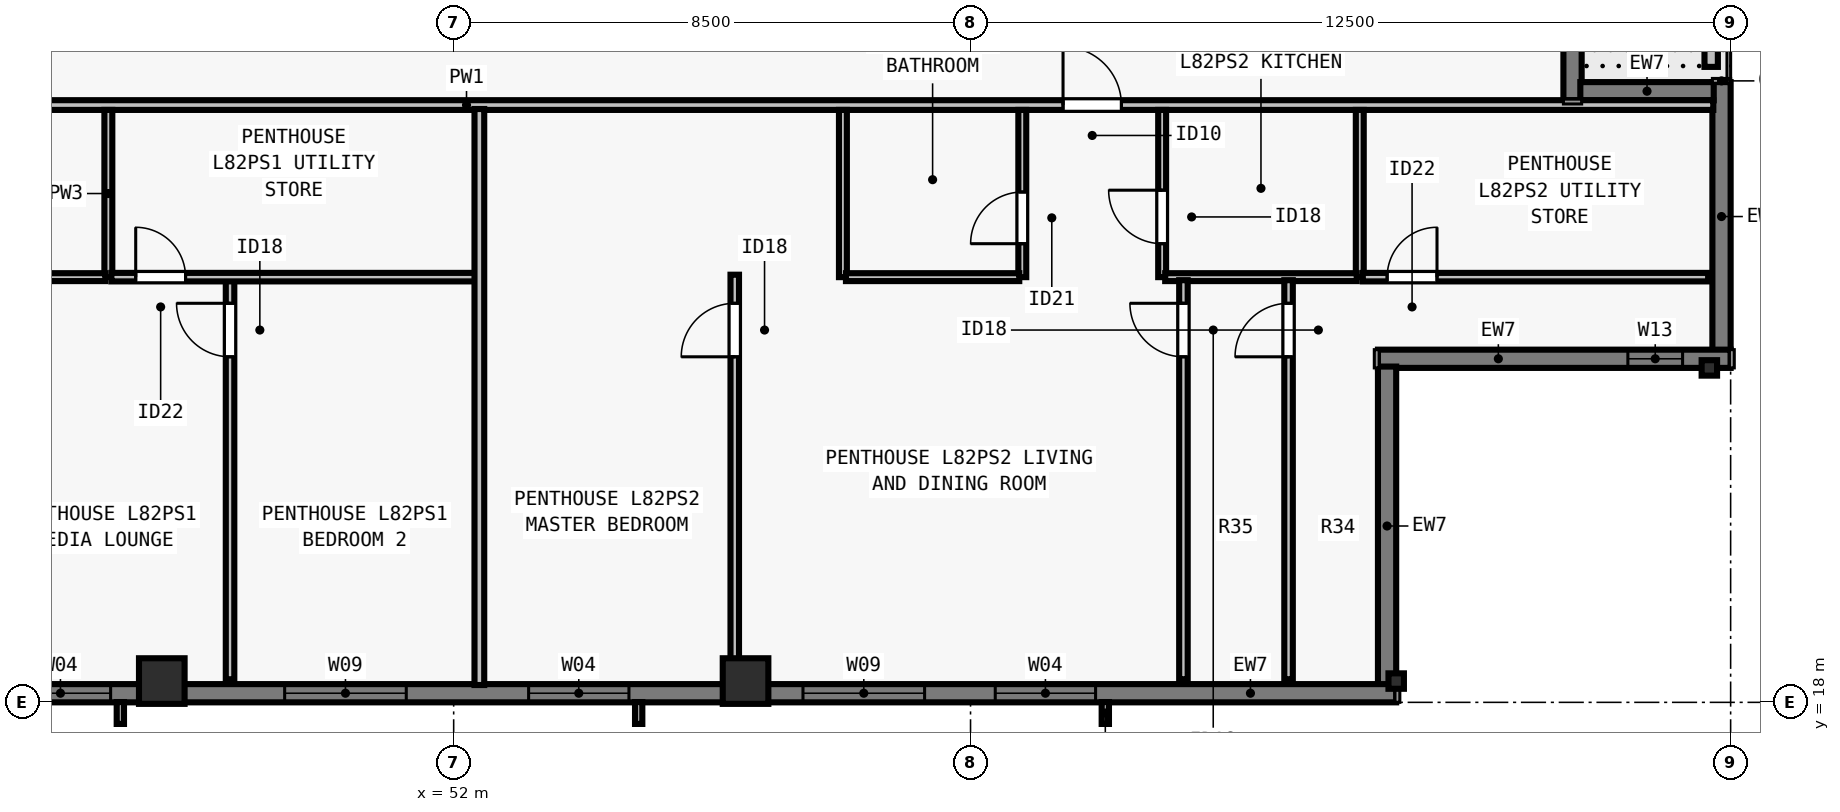
"""IFC4 building model, lengths in metres.
Left out: names, types, materials, properties, quantities, classifications, styles, units other than length and angle.
Written with IfcOpenShell. Run it as: python <this file> out.ifc"""

import sys

from ifc_helpers import new_model, si_unit, direction, frame, frame_2d, origin, origin_2d, place, context, subcontext, project, spatial, rectangle, i_section, extrude, element, fill, save


model = new_model("IFC4")
c1 = context("Model", 3, precision=1e-05, world=origin(), true_north=direction((0.0, 1.0)))
c2 = subcontext(c1, "Body", "Model", "MODEL_VIEW")
j1 = project(units=[si_unit("LENGTHUNIT", "METRE"), si_unit("PLANEANGLEUNIT", "RADIAN")], contexts=[c1])
p1 = place(None, origin())
s1 = spatial("IfcSite", under=j1, at=p1, CompositionType="ELEMENT")
p2 = place(p1, origin())
s2 = spatial("IfcBuilding", under=s1, at=p2, CompositionType="ELEMENT")
p3 = place(p2, frame((0.0, 0.0, 298.0)))
s3 = spatial("IfcBuildingStorey", under=s2, at=p3, CompositionType="ELEMENT", Elevation=298.0)
for number, where, z_axis, x_axis in (
    (1, (47.2, 18.35, 0.0), (0.0, 0.0, 1.0), (1.0, 0.0, 0.0)),
    (2, (56.8, 18.35, 0.0), (0.0, 0.0, 1.0), (1.0, 0.0, 0.0)),
):
    element("IfcColumn", number, at=place(p3, frame(where, z_axis=z_axis, x_axis=x_axis)), inside=s3, PredefinedType="COLUMN", context=c2, shape_type="SweptSolid", body=[
        extrude(rectangle(XDim=0.75, YDim=0.75, at=origin_2d()), origin(), (0.0, 0.0, 1.0), 3.5),
    ])
for number, where, z_axis, x_axis in (
    (3, (67.5, 18.35, 0.0), (0.0, 0.0, 1.0), (1.0, 0.0, 0.0)),
    (4, (72.65, 23.5, 0.0), (0.0, 0.0, 1.0), (0.0, 1.0, 0.0)),
):
    element("IfcColumn", number, at=place(p3, frame(where, z_axis=z_axis, x_axis=x_axis)), inside=s3, PredefinedType="COLUMN", context=c2, shape_type="SweptSolid", body=[
        extrude(i_section(OverallWidth=0.254, OverallDepth=0.254, WebThickness=0.009, FlangeThickness=0.014, FilletRadius=0.013, at=origin_2d()), origin(), (0.0, 0.0, 1.0), 3.5),
    ])
p4 = place(p3, frame((72.85, 28.2, 0.0), z_axis=(0.0, 0.0, 1.0), x_axis=(0.0, -1.0, 0.0)))
e5 = element("IfcWall", 5, at=p4, inside=s3, PredefinedType="SOLIDWALL", context=c2, shape_type="SweptSolid", body=[
    extrude(rectangle(XDim=4.422, YDim=0.3, at=frame_2d((2.211, 0.0))), origin(), (0.0, 0.0, 1.0), 3.29),
])
p5 = place(p3, frame((73.0, 23.65, 0.0), z_axis=(0.0, 0.0, 1.0), x_axis=(-1.0, 0.0, 0.0)))
e6 = element("IfcWall", 6, at=p5, inside=s3, PredefinedType="SOLIDWALL", context=c2, shape_type="SweptSolid", body=[
    extrude(rectangle(XDim=5.8, YDim=0.3, at=frame_2d((2.9, 0.0))), origin(), (0.0, 0.0, 1.0), 3.29),
])
p6 = place(p5, frame((0.79, 0.0, 0.8)))
e7 = element("IfcOpeningElement", 7, at=p6, cuts=e6, PredefinedType="OPENING", context=c2, shape_type="SweptSolid", body=[
    extrude(rectangle(XDim=0.9, YDim=1.75, at=frame_2d((0.45, 0.875))), frame((0.0, 0.16, 0.0), z_axis=(0.0, -1.0, 0.0), x_axis=(1.0, 0.0, 0.0)), (0.0, 0.0, 1.0), 0.32),
])
p7 = place(p3, frame((67.35, 23.522, 0.0), z_axis=(0.0, 0.0, 1.0), x_axis=(0.0, -1.0, 0.0)))
e8 = element("IfcWall", 8, at=p7, inside=s3, PredefinedType="SOLIDWALL", context=c2, shape_type="SweptSolid", body=[
    extrude(rectangle(XDim=5.244, YDim=0.3, at=frame_2d((2.622, 0.0))), origin(), (0.0, 0.0, 1.0), 3.29),
])
p8 = place(p3, frame((67.5, 18.15, 0.0), z_axis=(0.0, 0.0, 1.0), x_axis=(-1.0, 0.0, 0.0)))
e9 = element("IfcWall", 9, at=p8, inside=s3, PredefinedType="SOLIDWALL", context=c2, shape_type="SweptSolid", body=[
    extrude(rectangle(XDim=30.722, YDim=0.3, at=frame_2d((15.361, 0.0))), origin(), (0.0, 0.0, 1.0), 3.29),
])
p9 = place(p8, frame((4.944, 0.0, 0.8)))
e10 = element("IfcOpeningElement", 10, at=p9, cuts=e9, PredefinedType="OPENING", context=c2, shape_type="SweptSolid", body=[
    extrude(rectangle(XDim=1.65, YDim=1.758, at=frame_2d((0.825, 0.879))), frame((0.0, 0.16, 0.0), z_axis=(0.0, -1.0, 0.0), x_axis=(1.0, 0.0, 0.0)), (0.0, 0.0, 1.0), 0.32),
])
p10 = place(p8, frame((7.756, 0.0, 0.8)))
e11 = element("IfcOpeningElement", 11, at=p10, cuts=e9, PredefinedType="OPENING", context=c2, shape_type="SweptSolid", body=[
    extrude(rectangle(XDim=2.0, YDim=1.758, at=frame_2d((1.0, 0.879))), frame((0.0, 0.16, 0.0), z_axis=(0.0, -1.0, 0.0), x_axis=(1.0, 0.0, 0.0)), (0.0, 0.0, 1.0), 0.32),
])
p11 = place(p8, frame((12.617, 0.0, 0.8)))
e12 = element("IfcOpeningElement", 12, at=p11, cuts=e9, PredefinedType="OPENING", context=c2, shape_type="SweptSolid", body=[
    extrude(rectangle(XDim=1.65, YDim=1.758, at=frame_2d((0.825, 0.879))), frame((0.0, 0.16, 0.0), z_axis=(0.0, -1.0, 0.0), x_axis=(1.0, 0.0, 0.0)), (0.0, 0.0, 1.0), 0.32),
])
p12 = place(p8, frame((16.28, 0.0, 0.8)))
e13 = element("IfcOpeningElement", 13, at=p12, cuts=e9, PredefinedType="OPENING", context=c2, shape_type="SweptSolid", body=[
    extrude(rectangle(XDim=2.0, YDim=1.758, at=frame_2d((1.0, 0.879))), frame((0.0, 0.16, 0.0), z_axis=(0.0, -1.0, 0.0), x_axis=(1.0, 0.0, 0.0)), (0.0, 0.0, 1.0), 0.32),
])
p13 = place(p8, frame((21.142, 0.0, 0.8)))
e14 = element("IfcOpeningElement", 14, at=p13, cuts=e9, PredefinedType="OPENING", context=c2, shape_type="SweptSolid", body=[
    extrude(rectangle(XDim=1.65, YDim=1.758, at=frame_2d((0.825, 0.879))), frame((0.0, 0.16, 0.0), z_axis=(0.0, -1.0, 0.0), x_axis=(1.0, 0.0, 0.0)), (0.0, 0.0, 1.0), 0.32),
])
p14 = place(p8, frame((23.954, 0.0, 0.8)))
e15 = element("IfcOpeningElement", 15, at=p14, cuts=e9, PredefinedType="OPENING", context=c2, shape_type="SweptSolid", body=[
    extrude(rectangle(XDim=2.0, YDim=1.758, at=frame_2d((1.0, 0.879))), frame((0.0, 0.16, 0.0), z_axis=(0.0, -1.0, 0.0), x_axis=(1.0, 0.0, 0.0)), (0.0, 0.0, 1.0), 0.32),
])
p15 = place(p3, frame((70.4, 33.622, 0.0), z_axis=(0.0, 0.0, 1.0), x_axis=(0.0, -1.0, 0.0)))
e16 = element("IfcWall", 16, at=p15, inside=s3, PredefinedType="SOLIDWALL", context=c2, shape_type="SweptSolid", body=[
    extrude(rectangle(XDim=5.722, YDim=0.3, at=frame_2d((2.861, 0.0))), origin(), (0.0, 0.0, 1.0), 3.29),
])
p16 = place(p15, frame((1.436, 0.0, 0.0)))
e17 = element("IfcOpeningElement", 17, at=p16, cuts=e16, PredefinedType="OPENING", context=c2, shape_type="SweptSolid", body=[
    extrude(rectangle(XDim=1.0, YDim=2.15, at=frame_2d((0.5, 1.075))), frame((0.0, 0.16, 0.0), z_axis=(0.0, -1.0, 0.0), x_axis=(1.0, 0.0, 0.0)), (0.0, 0.0, 1.0), 0.32),
])
p17 = place(p3, frame((70.528, 28.05, 0.0), z_axis=(0.0, 0.0, 1.0), x_axis=(1.0, 0.0, 0.0)))
e18 = element("IfcWall", 18, at=p17, inside=s3, PredefinedType="SOLIDWALL", context=c2, shape_type="SweptSolid", body=[
    extrude(rectangle(XDim=2.194, YDim=0.3, at=frame_2d((1.097, 0.0))), origin(), (0.0, 0.0, 1.0), 3.29),
])
p18 = place(p3, frame((72.68, 28.45, 0.0), z_axis=(0.0, 0.0, 1.0), x_axis=(0.0, 1.0, 0.0)))
e19 = element("IfcWall", 19, at=p18, inside=s3, PredefinedType="PARAPET", context=c2, shape_type="SweptSolid", body=[
    extrude(rectangle(XDim=1.3, YDim=0.22, at=frame_2d((0.65, 0.0))), origin(), (0.0, 0.0, 1.0), 0.55),
])
p19 = place(p3, frame((31.285, 27.823, 0.0), z_axis=(0.0, 0.0, 1.0), x_axis=(1.0, 0.0, 0.0)))
e20 = element("IfcWall", 20, at=p19, inside=s3, PredefinedType="PARTITIONING", context=c2, shape_type="SweptSolid", body=[
    extrude(rectangle(XDim=41.43, YDim=0.16, at=frame_2d((20.715, 0.0))), origin(), (0.0, 0.0, 1.0), 3.009),
])
p20 = place(p19, frame((10.156, 0.0, 0.0)))
e21 = element("IfcOpeningElement", 21, at=p20, cuts=e20, PredefinedType="OPENING", context=c2, shape_type="SweptSolid", body=[
    extrude(rectangle(XDim=0.96, YDim=2.18, at=frame_2d((0.48, 1.09))), frame((0.0, 0.09, 0.0), z_axis=(0.0, -1.0, 0.0), x_axis=(1.0, 0.0, 0.0)), (0.0, 0.0, 1.0), 0.18),
])
p21 = place(p19, frame((30.736, 0.0, 0.0)))
e22 = element("IfcOpeningElement", 22, at=p21, cuts=e20, PredefinedType="OPENING", context=c2, shape_type="SweptSolid", body=[
    extrude(rectangle(XDim=0.96, YDim=2.18, at=frame_2d((0.48, 1.09))), frame((0.0, 0.09, 0.0), z_axis=(0.0, -1.0, 0.0), x_axis=(1.0, 0.0, 0.0)), (0.0, 0.0, 1.0), 0.18),
])
p22 = place(p3, frame((46.321, 24.992, 0.0), z_axis=(0.0, 0.0, 1.0), x_axis=(0.0, 1.0, 0.0)))
e23 = element("IfcWall", 23, at=p22, inside=s3, PredefinedType="PLUMBINGWALL", context=c2, shape_type="SweptSolid", body=[
    extrude(rectangle(XDim=2.75, YDim=0.13, at=frame_2d((1.375, 0.0))), origin(), (0.0, 0.0, 1.0), 3.29),
])
p23 = place(p3, frame((43.121, 24.992, 0.0), z_axis=(0.0, 0.0, 1.0), x_axis=(1.0, 0.0, 0.0)))
e24 = element("IfcWall", 24, at=p23, inside=s3, PredefinedType="PLUMBINGWALL", context=c2, shape_type="SweptSolid", body=[
    extrude(rectangle(XDim=3.15, YDim=0.13, at=frame_2d((1.575, 0.0))), origin(), (0.0, 0.0, 1.0), 3.29),
])
p24 = place(p3, frame((48.323, 18.38, 0.0), z_axis=(0.0, 0.0, 1.0), x_axis=(0.0, 1.0, 0.0)))
e25 = element("IfcWall", 25, at=p24, inside=s3, PredefinedType="PARTITIONING", context=c2, shape_type="SweptSolid", body=[
    extrude(rectangle(XDim=6.653, YDim=0.14, at=frame_2d((3.326, 0.0))), origin(), (0.0, 0.0, 1.0), 3.009),
])
p25 = place(p24, frame((5.302, 0.0, 0.0)))
e26 = element("IfcOpeningElement", 26, at=p25, cuts=e25, PredefinedType="OPENING", context=c2, shape_type="SweptSolid", body=[
    extrude(rectangle(XDim=0.88, YDim=2.1, at=frame_2d((0.44, 1.05))), frame((0.0, 0.08, 0.0), z_axis=(0.0, -1.0, 0.0), x_axis=(1.0, 0.0, 0.0)), (0.0, 0.0, 1.0), 0.16),
])
p26 = place(p3, frame((46.371, 24.992, 0.0), z_axis=(0.0, 0.0, 1.0), x_axis=(1.0, 0.0, 0.0)))
e27 = element("IfcWall", 27, at=p26, inside=s3, PredefinedType="PARTITIONING", context=c2, shape_type="SweptSolid", body=[
    extrude(rectangle(XDim=6.101, YDim=0.14, at=frame_2d((3.051, 0.0))), origin(), (0.0, 0.0, 1.0), 3.29),
])
p27 = place(p26, frame((0.4, 0.0, 0.0)))
e28 = element("IfcOpeningElement", 28, at=p27, cuts=e27, PredefinedType="OPENING", context=c2, shape_type="SweptSolid", body=[
    extrude(rectangle(XDim=0.82, YDim=2.1, at=frame_2d((0.41, 1.05))), frame((0.0, 0.08, 0.0), z_axis=(0.0, -1.0, 0.0), x_axis=(1.0, 0.0, 0.0)), (0.0, 0.0, 1.0), 0.16),
])
p28 = place(p3, frame((52.423, 18.285, 0.0), z_axis=(0.0, 0.0, 1.0), x_axis=(0.0, 1.0, 0.0)))
e29 = element("IfcWall", 29, at=p28, inside=s3, PredefinedType="PARTITIONING", context=c2, shape_type="SweptSolid", body=[
    extrude(rectangle(XDim=9.473, YDim=0.16, at=frame_2d((4.736, 0.0))), origin(), (0.0, 0.0, 1.0), 3.009),
])
p29 = place(p3, frame((58.401, 24.992, 0.0), z_axis=(0.0, 0.0, 1.0), x_axis=(0.0, 1.0, 0.0)))
e30 = element("IfcWall", 30, at=p29, inside=s3, PredefinedType="PLUMBINGWALL", context=c2, shape_type="SweptSolid", body=[
    extrude(rectangle(XDim=2.75, YDim=0.13, at=frame_2d((1.375, 0.0))), origin(), (0.0, 0.0, 1.0), 3.29),
])
p30 = place(p3, frame((61.351, 24.992, 0.0), z_axis=(0.0, 0.0, 1.0), x_axis=(0.0, 1.0, 0.0)))
e31 = element("IfcWall", 31, at=p30, inside=s3, PredefinedType="PLUMBINGWALL", context=c2, shape_type="SweptSolid", body=[
    extrude(rectangle(XDim=2.75, YDim=0.13, at=frame_2d((1.375, 0.0))), origin(), (0.0, 0.0, 1.0), 3.29),
])
p31 = place(p30, frame((0.55, 0.0, 0.0)))
e32 = element("IfcOpeningElement", 32, at=p31, cuts=e31, PredefinedType="OPENING", context=c2, shape_type="SweptSolid", body=[
    extrude(rectangle(XDim=0.85, YDim=2.08, at=frame_2d((0.425, 1.04))), frame((0.0, 0.075, 0.0), z_axis=(0.0, -1.0, 0.0), x_axis=(1.0, 0.0, 0.0)), (0.0, 0.0, 1.0), 0.15),
])
p32 = place(p3, frame((58.451, 24.992, 0.0), z_axis=(0.0, 0.0, 1.0), x_axis=(1.0, 0.0, 0.0)))
e33 = element("IfcWall", 33, at=p32, inside=s3, PredefinedType="PLUMBINGWALL", context=c2, shape_type="SweptSolid", body=[
    extrude(rectangle(XDim=2.85, YDim=0.13, at=frame_2d((1.425, 0.0))), origin(), (0.0, 0.0, 1.0), 3.29),
])
p33 = place(p3, frame((66.901, 24.992, 0.0), z_axis=(0.0, 0.0, 1.0), x_axis=(0.0, 1.0, 0.0)))
e34 = element("IfcWall", 34, at=p33, inside=s3, PredefinedType="PLUMBINGWALL", context=c2, shape_type="SweptSolid", body=[
    extrude(rectangle(XDim=2.75, YDim=0.13, at=frame_2d((1.375, 0.0))), origin(), (0.0, 0.0, 1.0), 3.29),
])
p34 = place(p3, frame((63.651, 24.992, 0.0), z_axis=(0.0, 0.0, 1.0), x_axis=(0.0, 1.0, 0.0)))
e35 = element("IfcWall", 35, at=p34, inside=s3, PredefinedType="PLUMBINGWALL", context=c2, shape_type="SweptSolid", body=[
    extrude(rectangle(XDim=2.75, YDim=0.13, at=frame_2d((1.375, 0.0))), origin(), (0.0, 0.0, 1.0), 2.653),
])
p35 = place(p34, frame((0.55, 0.0, 0.0)))
e36 = element("IfcOpeningElement", 36, at=p35, cuts=e35, PredefinedType="OPENING", context=c2, shape_type="SweptSolid", body=[
    extrude(rectangle(XDim=0.88, YDim=2.1, at=frame_2d((0.44, 1.05))), frame((0.0, 0.075, 0.0), z_axis=(0.0, -1.0, 0.0), x_axis=(1.0, 0.0, 0.0)), (0.0, 0.0, 1.0), 0.15),
])
p36 = place(p3, frame((63.701, 24.992, 0.0), z_axis=(0.0, 0.0, 1.0), x_axis=(1.0, 0.0, 0.0)))
e37 = element("IfcWall", 37, at=p36, inside=s3, PredefinedType="PLUMBINGWALL", context=c2, shape_type="SweptSolid", body=[
    extrude(rectangle(XDim=3.15, YDim=0.13, at=frame_2d((1.575, 0.0))), origin(), (0.0, 0.0, 1.0), 3.29),
])
p37 = place(p3, frame((56.623, 18.38, 0.0), z_axis=(0.0, 0.0, 1.0), x_axis=(0.0, 1.0, 0.0)))
e38 = element("IfcWall", 38, at=p37, inside=s3, PredefinedType="PARTITIONING", context=c2, shape_type="SweptSolid", body=[
    extrude(rectangle(XDim=6.653, YDim=0.14, at=frame_2d((3.326, 0.0))), origin(), (0.0, 0.0, 1.0), 2.653),
])
p38 = place(p37, frame((5.302, 0.0, 0.0)))
e39 = element("IfcOpeningElement", 39, at=p38, cuts=e38, PredefinedType="OPENING", context=c2, shape_type="SweptSolid", body=[
    extrude(rectangle(XDim=0.88, YDim=2.1, at=frame_2d((0.44, 1.05))), frame((0.0, 0.08, 0.0), z_axis=(0.0, -1.0, 0.0), x_axis=(1.0, 0.0, 0.0)), (0.0, 0.0, 1.0), 0.16),
])
p39 = place(p3, frame((65.73, 18.38, 0.0), z_axis=(0.0, 0.0, 1.0), x_axis=(0.0, 1.0, 0.0)))
e40 = element("IfcWall", 40, at=p39, inside=s3, PredefinedType="PARTITIONING", context=c2, shape_type="SweptSolid", body=[
    extrude(rectangle(XDim=6.562, YDim=0.14, at=frame_2d((3.281, 0.0))), origin(), (0.0, 0.0, 1.0), 2.653),
])
p40 = place(p39, frame((5.302, 0.0, 0.0)))
e41 = element("IfcOpeningElement", 41, at=p40, cuts=e40, PredefinedType="OPENING", context=c2, shape_type="SweptSolid", body=[
    extrude(rectangle(XDim=0.88, YDim=2.1, at=frame_2d((0.44, 1.05))), frame((0.0, 0.08, 0.0), z_axis=(0.0, -1.0, 0.0), x_axis=(1.0, 0.0, 0.0)), (0.0, 0.0, 1.0), 0.16),
])
p41 = place(p3, frame((66.951, 24.992, 0.0), z_axis=(0.0, 0.0, 1.0), x_axis=(1.0, 0.0, 0.0)))
e42 = element("IfcWall", 42, at=p41, inside=s3, PredefinedType="PARTITIONING", context=c2, shape_type="SweptSolid", body=[
    extrude(rectangle(XDim=5.679, YDim=0.14, at=frame_2d((2.839, 0.0))), origin(), (0.0, 0.0, 1.0), 3.009),
])
p42 = place(p41, frame((0.4, 0.0, 0.0)))
e43 = element("IfcOpeningElement", 43, at=p42, cuts=e42, PredefinedType="OPENING", context=c2, shape_type="SweptSolid", body=[
    extrude(rectangle(XDim=0.82, YDim=2.1, at=frame_2d((0.41, 1.05))), frame((0.0, 0.08, 0.0), z_axis=(0.0, -1.0, 0.0), x_axis=(1.0, 0.0, 0.0)), (0.0, 0.0, 1.0), 0.16),
])
p43 = place(p3, frame((64.001, 18.38, 0.0), z_axis=(0.0, 0.0, 1.0), x_axis=(0.0, 1.0, 0.0)))
e44 = element("IfcWall", 44, at=p43, inside=s3, PredefinedType="PARTITIONING", context=c2, shape_type="SweptSolid", body=[
    extrude(rectangle(XDim=6.562, YDim=0.14, at=frame_2d((3.281, 0.0))), origin(), (0.0, 0.0, 1.0), 2.653),
])
p44 = place(p43, frame((5.302, 0.0, 0.0)))
e45 = element("IfcOpeningElement", 45, at=p44, cuts=e44, PredefinedType="OPENING", context=c2, shape_type="SweptSolid", body=[
    extrude(rectangle(XDim=0.88, YDim=2.1, at=frame_2d((0.44, 1.05))), frame((0.0, 0.08, 0.0), z_axis=(0.0, -1.0, 0.0), x_axis=(1.0, 0.0, 0.0)), (0.0, 0.0, 1.0), 0.16),
])
p45 = place(p9, origin())
e46 = element("IfcWindow", 46, at=p45, inside=s3, PartitioningType="SINGLE_PANEL", PredefinedType="WINDOW", context=c2, shape_type="SweptSolid", body=[
    extrude(rectangle(XDim=1.65, YDim=1.758, at=frame_2d((0.825, 0.879))), frame((0.0, -0.05, 0.0), z_axis=(0.0, -1.0, 0.0), x_axis=(1.0, 0.0, 0.0)), (0.0, 0.0, 1.0), 0.06),
])
fill(e10, e46)
p46 = place(p10, origin())
e47 = element("IfcWindow", 47, at=p46, inside=s3, PartitioningType="SINGLE_PANEL", PredefinedType="WINDOW", context=c2, shape_type="SweptSolid", body=[
    extrude(rectangle(XDim=2.0, YDim=1.758, at=frame_2d((1.0, 0.879))), frame((0.0, -0.05, 0.0), z_axis=(0.0, -1.0, 0.0), x_axis=(1.0, 0.0, 0.0)), (0.0, 0.0, 1.0), 0.06),
])
fill(e11, e47)
p47 = place(p11, origin())
e48 = element("IfcWindow", 48, at=p47, inside=s3, PartitioningType="SINGLE_PANEL", PredefinedType="WINDOW", context=c2, shape_type="SweptSolid", body=[
    extrude(rectangle(XDim=1.65, YDim=1.758, at=frame_2d((0.825, 0.879))), frame((0.0, -0.05, 0.0), z_axis=(0.0, -1.0, 0.0), x_axis=(1.0, 0.0, 0.0)), (0.0, 0.0, 1.0), 0.06),
])
fill(e12, e48)
p48 = place(p12, origin())
e49 = element("IfcWindow", 49, at=p48, inside=s3, PartitioningType="SINGLE_PANEL", PredefinedType="WINDOW", context=c2, shape_type="SweptSolid", body=[
    extrude(rectangle(XDim=2.0, YDim=1.758, at=frame_2d((1.0, 0.879))), frame((0.0, -0.05, 0.0), z_axis=(0.0, -1.0, 0.0), x_axis=(1.0, 0.0, 0.0)), (0.0, 0.0, 1.0), 0.06),
])
fill(e13, e49)
p49 = place(p13, origin())
e50 = element("IfcWindow", 50, at=p49, inside=s3, PartitioningType="SINGLE_PANEL", PredefinedType="WINDOW", context=c2, shape_type="SweptSolid", body=[
    extrude(rectangle(XDim=1.65, YDim=1.758, at=frame_2d((0.825, 0.879))), frame((0.0, -0.05, 0.0), z_axis=(0.0, -1.0, 0.0), x_axis=(1.0, 0.0, 0.0)), (0.0, 0.0, 1.0), 0.06),
])
fill(e14, e50)
p50 = place(p6, origin())
e51 = element("IfcWindow", 51, at=p50, inside=s3, PartitioningType="SINGLE_PANEL", PredefinedType="WINDOW", context=c2, shape_type="SweptSolid", body=[
    extrude(rectangle(XDim=0.9, YDim=1.75, at=frame_2d((0.45, 0.875))), frame((0.0, -0.04, 0.0), z_axis=(0.0, -1.0, 0.0), x_axis=(1.0, 0.0, 0.0)), (0.0, 0.0, 1.0), 0.06),
])
fill(e7, e51)
p51 = place(p27, origin())
e52 = element("IfcDoor", 52, at=p51, inside=s3, OperationType="SINGLE_SWING_LEFT", PredefinedType="DOOR", context=c2, shape_type="SweptSolid", body=[
    extrude(rectangle(XDim=0.82, YDim=2.1, at=frame_2d((0.41, 1.05))), frame((0.0, 0.025, 0.0), z_axis=(0.0, -1.0, 0.0), x_axis=(1.0, 0.0, 0.0)), (0.0, 0.0, 1.0), 0.05),
])
fill(e28, e52)
p52 = place(p25, origin())
e53 = element("IfcDoor", 53, at=p52, inside=s3, OperationType="SINGLE_SWING_RIGHT", PredefinedType="DOOR", context=c2, shape_type="SweptSolid", body=[
    extrude(rectangle(XDim=0.88, YDim=2.1, at=frame_2d((0.44, 1.05))), frame((0.0, 0.025, 0.0), z_axis=(0.0, -1.0, 0.0), x_axis=(1.0, 0.0, 0.0)), (0.0, 0.0, 1.0), 0.05),
])
fill(e26, e53)
p53 = place(p31, origin())
e54 = element("IfcDoor", 54, at=p53, inside=s3, OperationType="SINGLE_SWING_LEFT", PredefinedType="DOOR", context=c2, shape_type="SweptSolid", body=[
    extrude(rectangle(XDim=0.85, YDim=2.08, at=frame_2d((0.425, 1.04))), frame((0.0, 0.025, 0.0), z_axis=(0.0, -1.0, 0.0), x_axis=(1.0, 0.0, 0.0)), (0.0, 0.0, 1.0), 0.05),
])
fill(e32, e54)
p54 = place(p35, origin())
e55 = element("IfcDoor", 55, at=p54, inside=s3, OperationType="SINGLE_SWING_RIGHT", PredefinedType="DOOR", context=c2, shape_type="SweptSolid", body=[
    extrude(rectangle(XDim=0.88, YDim=2.1, at=frame_2d((0.44, 1.05))), frame((0.0, 0.025, 0.0), z_axis=(0.0, -1.0, 0.0), x_axis=(1.0, 0.0, 0.0)), (0.0, 0.0, 1.0), 0.05),
])
fill(e36, e55)
p55 = place(p38, origin())
e56 = element("IfcDoor", 56, at=p55, inside=s3, OperationType="SINGLE_SWING_LEFT", PredefinedType="DOOR", context=c2, shape_type="SweptSolid", body=[
    extrude(rectangle(XDim=0.88, YDim=2.1, at=frame_2d((0.44, 1.05))), frame((0.0, 0.025, 0.0), z_axis=(0.0, -1.0, 0.0), x_axis=(1.0, 0.0, 0.0)), (0.0, 0.0, 1.0), 0.05),
])
fill(e39, e56)
p56 = place(p42, origin())
e57 = element("IfcDoor", 57, at=p56, inside=s3, OperationType="SINGLE_SWING_RIGHT", PredefinedType="DOOR", context=c2, shape_type="SweptSolid", body=[
    extrude(rectangle(XDim=0.82, YDim=2.1, at=frame_2d((0.41, 1.05))), frame((0.0, 0.025, 0.0), z_axis=(0.0, -1.0, 0.0), x_axis=(1.0, 0.0, 0.0)), (0.0, 0.0, 1.0), 0.05),
])
fill(e43, e57)
p57 = place(p40, origin())
e58 = element("IfcDoor", 58, at=p57, inside=s3, OperationType="SINGLE_SWING_LEFT", PredefinedType="DOOR", context=c2, shape_type="SweptSolid", body=[
    extrude(rectangle(XDim=0.88, YDim=2.1, at=frame_2d((0.44, 1.05))), frame((0.0, 0.025, 0.0), z_axis=(0.0, -1.0, 0.0), x_axis=(1.0, 0.0, 0.0)), (0.0, 0.0, 1.0), 0.05),
])
fill(e41, e58)
p58 = place(p44, origin())
e59 = element("IfcDoor", 59, at=p58, inside=s3, OperationType="SINGLE_SWING_RIGHT", PredefinedType="DOOR", context=c2, shape_type="SweptSolid", body=[
    extrude(rectangle(XDim=0.88, YDim=2.1, at=frame_2d((0.44, 1.05))), frame((0.0, 0.025, 0.0), z_axis=(0.0, -1.0, 0.0), x_axis=(1.0, 0.0, 0.0)), (0.0, 0.0, 1.0), 0.05),
])
fill(e45, e59)
p59 = place(p21, origin())
e60 = element("IfcDoor", 60, at=p59, inside=s3, OperationType="SINGLE_SWING_LEFT", PredefinedType="DOOR", context=c2, shape_type="SweptSolid", body=[
    extrude(rectangle(XDim=0.96, YDim=2.18, at=frame_2d((0.48, 1.09))), frame((0.0, 0.025, 0.0), z_axis=(0.0, -1.0, 0.0), x_axis=(1.0, 0.0, 0.0)), (0.0, 0.0, 1.0), 0.05),
])
fill(e22, e60)
save(model, sys.argv[1])
